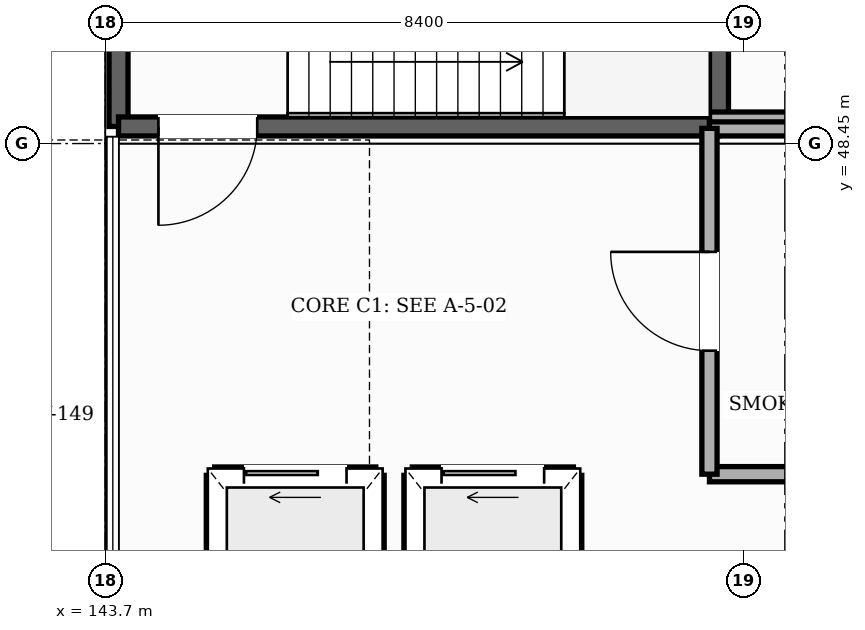
"""IFC4 building model, lengths in metres.
Left out: names, types, materials, properties, quantities, classifications, styles, units other than length and angle.
Written with IfcOpenShell. Run it as: python <this file> out.ifc"""

import sys

from ifc_helpers import new_model, si_unit, direction, frame, frame_2d, origin, place, context, subcontext, project, spatial, rectangle, extrude, element, fill, save


model = new_model("IFC4")
c1 = context("Model", 3, precision=1e-05, world=origin(), true_north=direction((0.0, 1.0)))
c2 = subcontext(c1, "Body", "Model", "MODEL_VIEW")
j1 = project(units=[si_unit("LENGTHUNIT", "METRE"), si_unit("PLANEANGLEUNIT", "RADIAN")], contexts=[c1])
p1 = place(None, origin())
s1 = spatial("IfcSite", under=j1, at=p1, CompositionType="ELEMENT")
p2 = place(p1, origin())
s2 = spatial("IfcBuilding", under=s1, at=p2, CompositionType="ELEMENT")
p3 = place(p2, frame((0.0, 0.0, 15.0)))
s3 = spatial("IfcBuildingStorey", under=s2, at=p3, CompositionType="ELEMENT", Elevation=15.0)
for number, where, z_axis, x_axis in (
    (1, (143.875, 48.675, 0.0), (0.0, 0.0, 1.0), (0.0, 1.0, 0.0)),
    (2, (151.775, 52.025, 0.0), (0.0, 0.0, 1.0), (0.0, -1.0, 0.0)),
):
    element("IfcWall", number, at=place(p3, frame(where, z_axis=z_axis, x_axis=x_axis)), inside=s3, PredefinedType="SHEAR", context=c2, shape_type="SweptSolid", body=[
        extrude(rectangle(XDim=3.35, YDim=0.25, at=frame_2d((1.675, 0.0))), origin(), (0.0, 0.0, 1.0), 4.56),
    ])
p4 = place(p3, frame((151.775, 48.675, 0.0), z_axis=(0.0, 0.0, 1.0), x_axis=(-1.0, 0.0, 0.0)))
e3 = element("IfcWall", 3, at=p4, inside=s3, PredefinedType="SHEAR", context=c2, shape_type="SweptSolid", body=[
    extrude(rectangle(XDim=7.9, YDim=0.25, at=frame_2d((3.95, 0.0))), origin(), (0.0, 0.0, 1.0), 4.56),
])
p5 = place(p4, frame((6.075, 0.0, 0.0)))
e4 = element("IfcOpeningElement", 4, at=p5, cuts=e3, PredefinedType="OPENING", context=c2, shape_type="SweptSolid", body=[
    extrude(rectangle(XDim=1.3, YDim=2.2, at=frame_2d((0.65, 1.1))), frame((0.0, 0.135, 0.0), z_axis=(0.0, -1.0, 0.0), x_axis=(1.0, 0.0, 0.0)), (0.0, 0.0, 1.0), 0.27),
])
p6 = place(p3, frame((145.14, 44.085, 0.0), z_axis=(0.0, 0.0, 1.0), x_axis=(1.0, 0.0, 0.0)))
e5 = element("IfcWall", 5, at=p6, inside=s3, PredefinedType="SHEAR", context=c2, shape_type="SweptSolid", body=[
    extrude(rectangle(XDim=2.12, YDim=0.22, at=frame_2d((1.06, 0.0))), origin(), (0.0, 0.0, 1.0), 4.56),
])
p7 = place(p6, frame((0.385, 0.0, 0.0)))
e6 = element("IfcOpeningElement", 6, at=p7, cuts=e5, PredefinedType="OPENING", context=c2, shape_type="SweptSolid", body=[
    extrude(rectangle(XDim=1.35, YDim=2.3, at=frame_2d((0.675, 1.15))), frame((0.0, 0.12, 0.0), z_axis=(0.0, -1.0, 0.0), x_axis=(1.0, 0.0, 0.0)), (0.0, 0.0, 1.0), 0.24),
])
for number, where, z_axis, x_axis in (
    (7, (147.26, 41.315, 0.0), (0.0, 0.0, 1.0), (0.0, 1.0, 0.0)),
    (8, (145.14, 41.315, 0.0), (0.0, 0.0, 1.0), (0.0, 1.0, 0.0)),
):
    element("IfcWall", number, at=place(p3, frame(where, z_axis=z_axis, x_axis=x_axis)), inside=s3, PredefinedType="SHEAR", context=c2, shape_type="SweptSolid", body=[
        extrude(rectangle(XDim=2.77, YDim=0.22, at=frame_2d((1.385, 0.0))), origin(), (0.0, 0.0, 1.0), 4.56),
    ])
p8 = place(p3, frame((147.74, 44.085, 0.0), z_axis=(0.0, 0.0, 1.0), x_axis=(1.0, 0.0, 0.0)))
e9 = element("IfcWall", 9, at=p8, inside=s3, PredefinedType="SHEAR", context=c2, shape_type="SweptSolid", body=[
    extrude(rectangle(XDim=2.12, YDim=0.22, at=frame_2d((1.06, 0.0))), origin(), (0.0, 0.0, 1.0), 4.56),
])
p9 = place(p8, frame((0.385, 0.0, 0.0)))
e10 = element("IfcOpeningElement", 10, at=p9, cuts=e9, PredefinedType="OPENING", context=c2, shape_type="SweptSolid", body=[
    extrude(rectangle(XDim=1.35, YDim=2.3, at=frame_2d((0.675, 1.15))), frame((0.0, 0.12, 0.0), z_axis=(0.0, -1.0, 0.0), x_axis=(1.0, 0.0, 0.0)), (0.0, 0.0, 1.0), 0.24),
])
for number, where, z_axis, x_axis in (
    (11, (149.86, 41.315, 0.0), (0.0, 0.0, 1.0), (0.0, 1.0, 0.0)),
    (12, (147.74, 41.315, 0.0), (0.0, 0.0, 1.0), (0.0, 1.0, 0.0)),
):
    element("IfcWall", number, at=place(p3, frame(where, z_axis=z_axis, x_axis=x_axis)), inside=s3, PredefinedType="SHEAR", context=c2, shape_type="SweptSolid", body=[
        extrude(rectangle(XDim=2.77, YDim=0.22, at=frame_2d((1.385, 0.0))), origin(), (0.0, 0.0, 1.0), 4.56),
    ])
for number, where, z_axis, x_axis in (
    (13, (151.65, 44.1, 0.0), (0.0, 0.0, 1.0), (1.0, 0.0, 0.0)),
    (14, (151.65, 48.65, 0.0), (0.0, 0.0, 1.0), (1.0, 0.0, 0.0)),
):
    element("IfcWall", number, at=place(p3, frame(where, z_axis=z_axis, x_axis=x_axis)), inside=s3, PredefinedType="SOLIDWALL", context=c2, shape_type="SweptSolid", body=[
        extrude(rectangle(XDim=3.55, YDim=0.2, at=frame_2d((1.775, 0.0))), origin(), (0.0, 0.0, 1.0), 4.545),
    ])
p10 = place(p3, frame((151.65, 48.8, 0.0), z_axis=(0.0, 0.0, 1.0), x_axis=(1.0, 0.0, 0.0)))
e15 = element("IfcWall", 15, at=p10, inside=s3, PredefinedType="PARTITIONING", context=c2, shape_type="SweptSolid", body=[
    extrude(rectangle(XDim=3.55, YDim=0.13, at=frame_2d((1.775, 0.0))), origin(), (0.0, 0.0, 1.0), 4.545),
])
p11 = place(p3, frame((151.65, 44.1, 0.0), z_axis=(0.0, 0.0, 1.0), x_axis=(0.0, 1.0, 0.0)))
e16 = element("IfcWall", 16, at=p11, inside=s3, PredefinedType="SOLIDWALL", context=c2, shape_type="SweptSolid", body=[
    extrude(rectangle(XDim=4.55, YDim=0.2, at=frame_2d((2.275, 0.0))), origin(), (0.0, 0.0, 1.0), 4.545),
])
p12 = place(p11, frame((1.625, 0.0, 0.0)))
e17 = element("IfcOpeningElement", 17, at=p12, cuts=e16, PredefinedType="OPENING", context=c2, shape_type="SweptSolid", body=[
    extrude(rectangle(XDim=1.3, YDim=2.2, at=frame_2d((0.65, 1.1))), frame((0.0, 0.11, 0.0), z_axis=(0.0, -1.0, 0.0), x_axis=(1.0, 0.0, 0.0)), (0.0, 0.0, 1.0), 0.22),
])
p13 = place(p5, origin())
e18 = element("IfcDoor", 18, at=p13, inside=s3, OperationType="SINGLE_SWING_RIGHT", PredefinedType="DOOR", context=c2, shape_type="SweptSolid", body=[
    extrude(rectangle(XDim=1.3, YDim=2.2, at=frame_2d((0.65, 1.1))), frame((0.0, 0.025, 0.0), z_axis=(0.0, -1.0, 0.0), x_axis=(1.0, 0.0, 0.0)), (0.0, 0.0, 1.0), 0.05),
])
fill(e4, e18)
p14 = place(p7, origin())
e19 = element("IfcDoor", 19, at=p14, inside=s3, OperationType="SLIDING_TO_LEFT", PredefinedType="DOOR", context=c2, shape_type="SweptSolid", body=[
    extrude(rectangle(XDim=1.35, YDim=2.3, at=frame_2d((0.675, 1.15))), frame((0.0, 0.025, 0.0), z_axis=(0.0, -1.0, 0.0), x_axis=(1.0, 0.0, 0.0)), (0.0, 0.0, 1.0), 0.05),
])
fill(e6, e19)
p15 = place(p9, origin())
e20 = element("IfcDoor", 20, at=p15, inside=s3, OperationType="SLIDING_TO_LEFT", PredefinedType="DOOR", context=c2, shape_type="SweptSolid", body=[
    extrude(rectangle(XDim=1.35, YDim=2.3, at=frame_2d((0.675, 1.15))), frame((0.0, 0.025, 0.0), z_axis=(0.0, -1.0, 0.0), x_axis=(1.0, 0.0, 0.0)), (0.0, 0.0, 1.0), 0.05),
])
fill(e10, e20)
p16 = place(p12, origin())
e21 = element("IfcDoor", 21, at=p16, inside=s3, OperationType="SINGLE_SWING_RIGHT", PredefinedType="DOOR", context=c2, shape_type="SweptSolid", body=[
    extrude(rectangle(XDim=1.3, YDim=2.2, at=frame_2d((0.65, 1.1))), frame((0.0, 0.025, 0.0), z_axis=(0.0, -1.0, 0.0), x_axis=(1.0, 0.0, 0.0)), (0.0, 0.0, 1.0), 0.05),
])
fill(e17, e21)
save(model, sys.argv[1])
